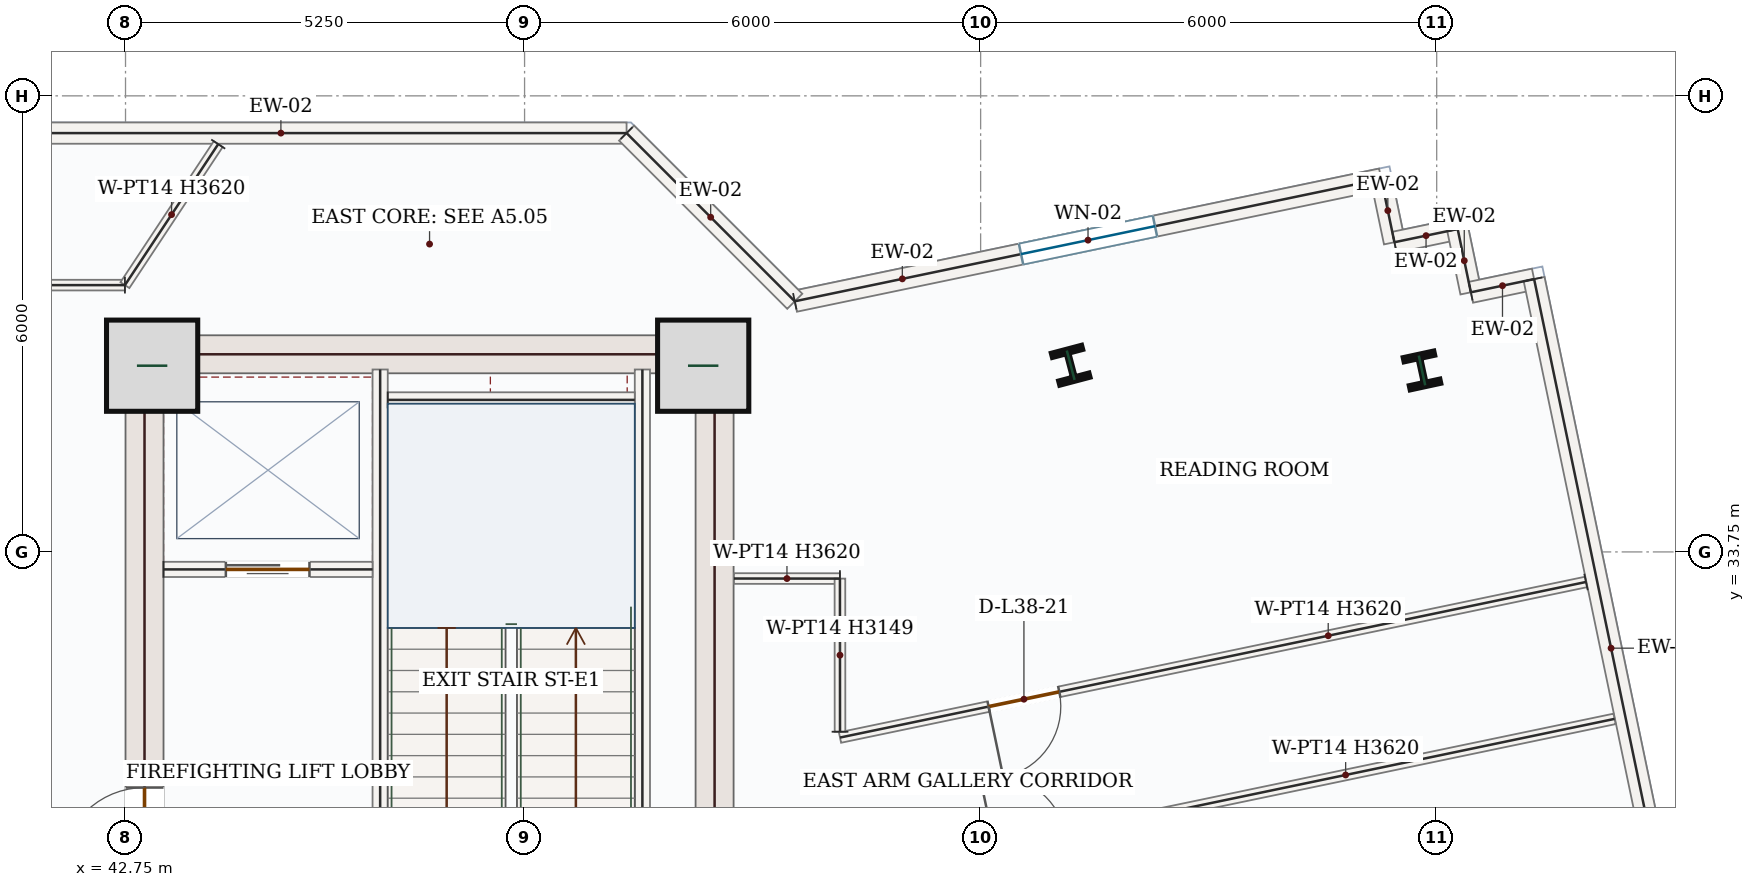
"""IFC4 building model, lengths in metres.
Left out: names, types, materials, properties, quantities, classifications, styles, units other than length and angle.
Written with IfcOpenShell. Run it as: python <this file> out.ifc"""

import sys

from ifc_helpers import new_model, si_unit, direction, frame, frame_2d, origin, origin_2d, place, context, subcontext, project, spatial, rectangle, i_section, extrude, source, transform, mapped, element, fill, save


model = new_model("IFC4")
c1 = context("Model", 3, precision=1e-05, world=origin(), true_north=direction((0.0, 1.0)))
c2 = subcontext(c1, "Body", "Model", "MODEL_VIEW")
j1 = project(units=[si_unit("LENGTHUNIT", "METRE"), si_unit("PLANEANGLEUNIT", "RADIAN")], contexts=[c1])
p1 = place(None, origin())
s1 = spatial("IfcSite", under=j1, at=p1, CompositionType="ELEMENT")
p2 = place(p1, origin())
s2 = spatial("IfcBuilding", under=s1, at=p2, CompositionType="ELEMENT")
p3 = place(p2, frame((0.0, 0.0, 166.8)))
s3 = spatial("IfcBuildingStorey", under=s2, at=p3, CompositionType="ELEMENT", Elevation=166.8)
p4 = place(p3, frame((43.0, 28.05, 0.0), z_axis=(0.0, 0.0, 1.0), x_axis=(0.0, 1.0, 0.0)))
e1 = element("IfcWall", 1, at=p4, inside=s3, PredefinedType="SHEAR", context=c2, shape_type="SweptSolid", body=[
    extrude(rectangle(XDim=8.55, YDim=0.5, at=frame_2d((4.275, 0.0))), origin(), (0.0, 0.0, 1.0), 3.62),
])
p5 = place(p4, frame((1.5, 0.0, 0.0)))
e2 = element("IfcOpeningElement", 2, at=p5, cuts=e1, PredefinedType="OPENING", context=c2, shape_type="SweptSolid", body=[
    extrude(rectangle(XDim=1.1, YDim=2.2, at=frame_2d((0.55, 1.1))), frame((0.0, 0.26, 0.0), z_axis=(0.0, -1.0, 0.0), x_axis=(1.0, 0.0, 0.0)), (0.0, 0.0, 1.0), 0.52),
])
m1 = source(origin(), c2, "Body", "SweptSolid", [
    extrude(rectangle(XDim=8.55, YDim=0.5, at=frame_2d((4.275, 0.0))), origin(), (0.0, 0.0, 1.0), 3.62),
])
p6 = place(p3, frame((50.5, 28.05, 0.0), z_axis=(0.0, 0.0, 1.0), x_axis=(0.0, 1.0, 0.0)))
e3 = element("IfcWall", 3, at=p6, inside=s3, PredefinedType="SHEAR", context=c2, shape_type="MappedRepresentation", body=[
    mapped(m1, transform((0.0, 0.0, 0.0), x_axis=(1.0, 0.0, 0.0), y_axis=(0.0, 1.0, 0.0), z_axis=(0.0, 0.0, 1.0), scale=1.0)),
])
m2 = source(origin(), c2, "Body", "SweptSolid", [
    extrude(rectangle(XDim=7.0, YDim=0.5, at=frame_2d((3.5, 0.0))), origin(), (0.0, 0.0, 1.0), 3.62),
])
p7 = place(p3, frame((43.25, 36.35, 0.0), z_axis=(0.0, 0.0, 1.0), x_axis=(1.0, 0.0, 0.0)))
e4 = element("IfcWall", 4, at=p7, inside=s3, PredefinedType="SHEAR", context=c2, shape_type="MappedRepresentation", body=[
    mapped(m2, transform((0.0, 0.0, 0.0), x_axis=(1.0, 0.0, 0.0), y_axis=(0.0, 1.0, 0.0), z_axis=(0.0, 0.0, 1.0), scale=1.0)),
])
m3 = source(origin(), c2, "Body", "SweptSolid", [
    extrude(rectangle(XDim=1.2, YDim=1.2, at=origin_2d()), origin(), (0.0, 0.0, 1.0), 3.9),
])
for number, where, z_axis, x_axis in (
    (5, (43.1, 36.2, 0.0), (0.0, 0.0, 1.0), (1.0, 0.0, 0.0)),
    (6, (50.35, 36.2, 0.0), (0.0, 0.0, 1.0), (1.0, 0.0, 0.0)),
):
    element("IfcColumn", number, at=place(p3, frame(where, z_axis=z_axis, x_axis=x_axis)), inside=s3, PredefinedType="COLUMN", context=c2, shape_type="MappedRepresentation", body=[
        mapped(m3, transform((0.0, 0.0, 0.0), x_axis=(1.0, 0.0, 0.0), y_axis=(0.0, 1.0, 0.0), z_axis=(0.0, 0.0, 1.0), scale=1.0)),
    ])
m4 = source(origin(), c2, "Body", "SweptSolid", [
    extrude(i_section(OverallWidth=0.412, OverallDepth=0.435, WebThickness=0.036, FlangeThickness=0.057, FilletRadius=0.018, at=origin_2d()), origin(), (0.0, 0.0, 1.0), 3.9),
])
for number, where, z_axis, x_axis in (
    (7, (55.185, 36.206, 0.0), (0.0, 0.0, 1.0), (0.967, 0.255, 0.0)),
    (8, (59.807, 36.137, 0.0), (0.0, 0.0, 1.0), (0.977, 0.211, 0.0)),
):
    element("IfcColumn", number, at=place(p3, frame(where, z_axis=z_axis, x_axis=x_axis)), inside=s3, PredefinedType="COLUMN", context=c2, shape_type="MappedRepresentation", body=[
        mapped(m4, transform((0.0, 0.0, 0.0), x_axis=(1.0, 0.0, 0.0), y_axis=(0.0, 1.0, 0.0), z_axis=(0.0, 0.0, 1.0), scale=1.0)),
    ])
p8 = place(p3, frame((51.555, 37.047, 0.0), z_axis=(0.0, 0.0, 1.0), x_axis=(0.978938136474, 0.204157108515, 0.0)))
e9 = element("IfcWall", 9, at=p8, inside=s3, PredefinedType="SOLIDWALL", context=c2, shape_type="SweptSolid", body=[
    extrude(rectangle(XDim=7.882, YDim=0.28, at=frame_2d((3.941, 0.0))), origin(), (0.0, 0.0, 1.0), 3.62),
])
p9 = place(p8, frame((3.041, 0.0, 0.85)))
e10 = element("IfcOpeningElement", 10, at=p9, cuts=e9, PredefinedType="OPENING", context=c2, shape_type="SweptSolid", body=[
    extrude(rectangle(XDim=1.8, YDim=1.75, at=frame_2d((0.9, 0.875))), frame((0.0, 0.15, 0.0), z_axis=(0.0, -1.0, 0.0), x_axis=(1.0, 0.0, 0.0)), (0.0, 0.0, 1.0), 0.3),
])
m5 = source(origin(), c2, "Body", "SweptSolid", [
    extrude(rectangle(XDim=0.85, YDim=0.28, at=frame_2d((0.425, 0.0))), origin(), (0.0, 0.0, 1.0), 3.62),
])
for number, where, z_axis, x_axis in (
    (11, (59.271, 38.656, 0.0), (0.0, 0.0, 1.0), (0.204, -0.979, 0.0)),
    (12, (59.444, 37.824, 0.0), (0.0, 0.0, 1.0), (0.979, 0.204, 0.0)),
):
    element("IfcWall", number, at=place(p3, frame(where, z_axis=z_axis, x_axis=x_axis)), inside=s3, PredefinedType="SOLIDWALL", context=c2, shape_type="MappedRepresentation", body=[
        mapped(m5, transform((0.0, 0.0, 0.0), x_axis=(1.0, 0.0, 0.0), y_axis=(0.0, 1.0, 0.0), z_axis=(0.0, 0.0, 1.0), scale=1.0)),
    ])
m6 = source(origin(), c2, "Body", "SweptSolid", [
    extrude(rectangle(XDim=0.85, YDim=0.28, at=frame_2d((0.425, 0.0))), origin(), (0.0, 0.0, 1.0), 3.62),
])
p10 = place(p3, frame((60.276, 37.998, 0.0), z_axis=(0.0, 0.0, 1.0), x_axis=(0.204447295999, -0.978877573121, 0.0)))
e13 = element("IfcWall", 13, at=p10, inside=s3, PredefinedType="SOLIDWALL", context=c2, shape_type="MappedRepresentation", body=[
    mapped(m6, transform((0.0, 0.0, 0.0), x_axis=(1.0, 0.0, 0.0), y_axis=(0.0, 1.0, 0.0), z_axis=(0.0, 0.0, 1.0), scale=1.0)),
])
p11 = place(p3, frame((60.45, 37.166, 0.0), z_axis=(0.0, 0.0, 1.0), x_axis=(0.978923028084, 0.20422954019, 0.0)))
e14 = element("IfcWall", 14, at=p11, inside=s3, PredefinedType="SOLIDWALL", context=c2, shape_type="MappedRepresentation", body=[
    mapped(m5, transform((0.0, 0.0, 0.0), x_axis=(1.0, 0.0, 0.0), y_axis=(0.0, 1.0, 0.0), z_axis=(0.0, 0.0, 1.0), scale=1.0)),
])
m7 = source(origin(), c2, "Body", "SweptSolid", [
    extrude(rectangle(XDim=9.92, YDim=0.28, at=frame_2d((4.96, 0.0))), origin(), (0.0, 0.0, 1.0), 3.62),
])
p12 = place(p3, frame((61.282, 37.339, 0.0), z_axis=(0.0, 0.0, 1.0), x_axis=(0.204150812873, -0.978939449406, 0.0)))
e15 = element("IfcWall", 15, at=p12, inside=s3, PredefinedType="SOLIDWALL", context=c2, shape_type="MappedRepresentation", body=[
    mapped(m7, transform((0.0, 0.0, 0.0), x_axis=(1.0, 0.0, 0.0), y_axis=(0.0, 1.0, 0.0), z_axis=(0.0, 0.0, 1.0), scale=1.0)),
])
m8 = source(origin(), c2, "Body", "SweptSolid", [
    extrude(rectangle(XDim=9.095, YDim=0.28, at=frame_2d((4.548, 0.0))), origin(), (0.0, 0.0, 1.0), 3.62),
])
p13 = place(p3, frame((40.247, 39.26, 0.0), z_axis=(0.0, 0.0, 1.0), x_axis=(1.0, 0.0, 0.0)))
e16 = element("IfcWall", 16, at=p13, inside=s3, PredefinedType="SOLIDWALL", context=c2, shape_type="MappedRepresentation", body=[
    mapped(m8, transform((0.0, 0.0, 0.0), x_axis=(1.0, 0.0, 0.0), y_axis=(0.0, 1.0, 0.0), z_axis=(0.0, 0.0, 1.0), scale=1.0)),
])
m9 = source(origin(), c2, "Body", "SweptSolid", [
    extrude(rectangle(XDim=3.129, YDim=0.28, at=frame_2d((1.565, 0.0))), origin(), (0.0, 0.0, 1.0), 3.62),
])
p14 = place(p3, frame((49.342, 39.26, 0.0), z_axis=(0.0, 0.0, 1.0), x_axis=(0.707067771627, -0.707145788594, 0.0)))
e17 = element("IfcWall", 17, at=p14, inside=s3, PredefinedType="SOLIDWALL", context=c2, shape_type="MappedRepresentation", body=[
    mapped(m9, transform((0.0, 0.0, 0.0), x_axis=(1.0, 0.0, 0.0), y_axis=(0.0, 1.0, 0.0), z_axis=(0.0, 0.0, 1.0), scale=1.0)),
])
m10 = source(origin(), c2, "Body", "SweptSolid", [
    extrude(rectangle(XDim=7.87, YDim=0.2, at=frame_2d((3.935, 0.0))), origin(), (0.0, 0.0, 1.0), 3.62),
])
p15 = place(p3, frame((49.55, 28.28, 0.0), z_axis=(0.0, 0.0, 1.0), x_axis=(0.0, 1.0, 0.0)))
e18 = element("IfcWall", 18, at=p15, inside=s3, PredefinedType="SOLIDWALL", context=c2, shape_type="MappedRepresentation", body=[
    mapped(m10, transform((0.0, 0.0, 0.0), x_axis=(1.0, 0.0, 0.0), y_axis=(0.0, 1.0, 0.0), z_axis=(0.0, 0.0, 1.0), scale=1.0)),
])
p16 = place(p3, frame((46.1, 28.15, 0.0), z_axis=(0.0, 0.0, 1.0), x_axis=(0.0, 1.0, 0.0)))
e19 = element("IfcWall", 19, at=p16, inside=s3, PredefinedType="SOLIDWALL", context=c2, shape_type="SweptSolid", body=[
    extrude(rectangle(XDim=8.0, YDim=0.2, at=frame_2d((4.0, 0.0))), origin(), (0.0, 0.0, 1.0), 3.62),
])
p17 = place(p16, frame((0.4, 0.0, 0.0)))
e20 = element("IfcOpeningElement", 20, at=p17, cuts=e19, PredefinedType="OPENING", context=c2, shape_type="SweptSolid", body=[
    extrude(rectangle(XDim=1.05, YDim=2.15, at=frame_2d((0.525, 1.075))), frame((0.0, 0.11, 0.0), z_axis=(0.0, -1.0, 0.0), x_axis=(1.0, 0.0, 0.0)), (0.0, 0.0, 1.0), 0.22),
])
m11 = source(origin(), c2, "Body", "SweptSolid", [
    extrude(rectangle(XDim=3.25, YDim=0.2, at=frame_2d((1.625, 0.0))), origin(), (0.0, 0.0, 1.0), 3.62),
])
p18 = place(p3, frame((46.2, 35.75, 0.0), z_axis=(0.0, 0.0, 1.0), x_axis=(1.0, 0.0, 0.0)))
e21 = element("IfcWall", 21, at=p18, inside=s3, PredefinedType="SOLIDWALL", context=c2, shape_type="MappedRepresentation", body=[
    mapped(m11, transform((0.0, 0.0, 0.0), x_axis=(1.0, 0.0, 0.0), y_axis=(0.0, 1.0, 0.0), z_axis=(0.0, 0.0, 1.0), scale=1.0)),
])
p19 = place(p3, frame((43.25, 33.52, 0.0), z_axis=(0.0, 0.0, 1.0), x_axis=(1.0, 0.0, 0.0)))
e22 = element("IfcWall", 22, at=p19, inside=s3, PredefinedType="SOLIDWALL", context=c2, shape_type="SweptSolid", body=[
    extrude(rectangle(XDim=2.75, YDim=0.2, at=frame_2d((1.375, 0.0))), origin(), (0.0, 0.0, 1.0), 3.62),
])
p20 = place(p19, frame((0.82, 0.0, 0.0)))
e23 = element("IfcOpeningElement", 23, at=p20, cuts=e22, PredefinedType="OPENING", context=c2, shape_type="SweptSolid", body=[
    extrude(rectangle(XDim=1.1, YDim=2.15, at=frame_2d((0.55, 1.075))), frame((0.0, 0.11, 0.0), z_axis=(0.0, -1.0, 0.0), x_axis=(1.0, 0.0, 0.0)), (0.0, 0.0, 1.0), 0.22),
])
p21 = place(p3, frame((42.742, 37.26, 0.0), z_axis=(0.0, 0.0, 1.0), x_axis=(-1.0, 0.0, 0.0)))
e24 = element("IfcWall", 24, at=p21, inside=s3, PredefinedType="PARTITIONING", context=c2, shape_type="SweptSolid", body=[
    extrude(rectangle(XDim=7.942, YDim=0.14, at=frame_2d((3.971, 0.0))), origin(), (0.0, 0.0, 1.0), 3.62),
])
p22 = place(p21, frame((5.454, 0.0, 0.0)))
e25 = element("IfcOpeningElement", 25, at=p22, cuts=e24, PredefinedType="OPENING", context=c2, shape_type="SweptSolid", body=[
    extrude(rectangle(XDim=0.95, YDim=2.15, at=frame_2d((0.475, 1.075))), frame((0.0, 0.08, 0.0), z_axis=(0.0, -1.0, 0.0), x_axis=(1.0, 0.0, 0.0)), (0.0, 0.0, 1.0), 0.16),
])
m12 = source(origin(), c2, "Body", "SweptSolid", [
    extrude(rectangle(XDim=2.224, YDim=0.14, at=frame_2d((1.112, 0.0))), origin(), (0.0, 0.0, 1.0), 3.62),
])
p23 = place(p3, frame((43.969, 39.115, 0.0), z_axis=(0.0, 0.0, 1.0), x_axis=(-0.551783828078, -0.833987174405, 0.0)))
e26 = element("IfcWall", 26, at=p23, inside=s3, PredefinedType="PARTITIONING", context=c2, shape_type="MappedRepresentation", body=[
    mapped(m12, transform((0.0, 0.0, 0.0), x_axis=(1.0, 0.0, 0.0), y_axis=(0.0, 1.0, 0.0), z_axis=(0.0, 0.0, 1.0), scale=1.0)),
])
p24 = place(p3, frame((52.15, 29.428, 0.0), z_axis=(0.0, 0.0, 1.0), x_axis=(0.978935516763, 0.204169669688, 0.0)))
e27 = element("IfcWall", 27, at=p24, inside=s3, PredefinedType="PARTITIONING", context=c2, shape_type="SweptSolid", body=[
    extrude(rectangle(XDim=10.409, YDim=0.14, at=frame_2d((5.205, 0.0))), origin(), (0.0, 0.0, 1.0), 3.62),
])
p25 = place(p24, frame((2.081, 0.0, 0.0)))
e28 = element("IfcOpeningElement", 28, at=p25, cuts=e27, PredefinedType="OPENING", context=c2, shape_type="SweptSolid", body=[
    extrude(rectangle(XDim=0.95, YDim=2.15, at=frame_2d((0.475, 1.075))), frame((0.0, 0.08, 0.0), z_axis=(0.0, -1.0, 0.0), x_axis=(1.0, 0.0, 0.0)), (0.0, 0.0, 1.0), 0.16),
])
m13 = source(origin(), c2, "Body", "SweptSolid", [
    extrude(rectangle(XDim=1.394, YDim=0.14, at=frame_2d((0.697, 0.0))), origin(), (0.0, 0.0, 1.0), 3.62),
])
p26 = place(p3, frame((52.149, 33.399, 0.0), z_axis=(0.0, 0.0, 1.0), x_axis=(-0.999999754632, 0.000700525222, 0.0)))
e29 = element("IfcWall", 29, at=p26, inside=s3, PredefinedType="PARTITIONING", context=c2, shape_type="MappedRepresentation", body=[
    mapped(m13, transform((0.0, 0.0, 0.0), x_axis=(1.0, 0.0, 0.0), y_axis=(0.0, 1.0, 0.0), z_axis=(0.0, 0.0, 1.0), scale=1.0)),
])
p27 = place(p3, frame((61.965, 33.354, 0.0), z_axis=(0.0, 0.0, 1.0), x_axis=(-0.978942518705, -0.204136094483, 0.0)))
e30 = element("IfcWall", 30, at=p27, inside=s3, PredefinedType="PARTITIONING", context=c2, shape_type="SweptSolid", body=[
    extrude(rectangle(XDim=10.026, YDim=0.14, at=frame_2d((5.013, 0.0))), origin(), (0.0, 0.0, 1.0), 3.62),
])
p28 = place(p27, frame((7.079, 0.0, 0.0)))
e31 = element("IfcOpeningElement", 31, at=p28, cuts=e30, PredefinedType="OPENING", context=c2, shape_type="SweptSolid", body=[
    extrude(rectangle(XDim=0.95, YDim=2.15, at=frame_2d((0.475, 1.075))), frame((0.0, 0.08, 0.0), z_axis=(0.0, -1.0, 0.0), x_axis=(1.0, 0.0, 0.0)), (0.0, 0.0, 1.0), 0.16),
])
m14 = source(origin(), c2, "Body", "SweptSolid", [
    extrude(rectangle(XDim=2.014, YDim=0.14, at=frame_2d((1.007, 0.0))), origin(), (0.0, 0.0, 1.0), 3.149),
])
p29 = place(p3, frame((52.15, 31.385, 0.0), z_axis=(0.0, 0.0, 1.0), x_axis=(-0.000484789665, 0.999999882489, 0.0)))
e32 = element("IfcWall", 32, at=p29, inside=s3, PredefinedType="PARTITIONING", context=c2, shape_type="MappedRepresentation", body=[
    mapped(m14, transform((0.0, 0.0, 0.0), x_axis=(1.0, 0.0, 0.0), y_axis=(0.0, 1.0, 0.0), z_axis=(0.0, 0.0, 1.0), scale=1.0)),
])
m15 = source(origin(), c2, "Body", "SweptSolid", [
    extrude(rectangle(XDim=1.8, YDim=1.75, at=frame_2d((0.9, 0.875))), frame((0.0, 0.03, 0.0), z_axis=(0.0, -1.0, 0.0), x_axis=(1.0, 0.0, 0.0)), (0.0, 0.0, 1.0), 0.06),
])
p30 = place(p9, origin())
e33 = element("IfcWindow", 33, at=p30, inside=s3, PartitioningType="DOUBLE_PANEL_VERTICAL", PredefinedType="WINDOW", context=c2, shape_type="MappedRepresentation", body=[
    mapped(m15, transform((0.0, 0.0, 0.0), x_axis=(1.0, 0.0, 0.0), y_axis=(0.0, 1.0, 0.0), z_axis=(0.0, 0.0, 1.0), scale=1.0)),
])
fill(e10, e33)
m16 = source(origin(), c2, "Body", "SweptSolid", [
    extrude(rectangle(XDim=1.1, YDim=2.15, at=frame_2d((0.55, 1.075))), frame((0.0, 0.025, 0.0), z_axis=(0.0, -1.0, 0.0), x_axis=(1.0, 0.0, 0.0)), (0.0, 0.0, 1.0), 0.05),
])
p31 = place(p20, origin())
e34 = element("IfcDoor", 34, at=p31, inside=s3, OperationType="DOUBLE_DOOR_SLIDING", PredefinedType="DOOR", context=c2, shape_type="MappedRepresentation", body=[
    mapped(m16, transform((0.0, 0.0, 0.0), x_axis=(1.0, 0.0, 0.0), y_axis=(0.0, 1.0, 0.0), z_axis=(0.0, 0.0, 1.0), scale=1.0)),
])
fill(e23, e34)
m17 = source(origin(), c2, "Body", "SweptSolid", [
    extrude(rectangle(XDim=1.1, YDim=2.2, at=frame_2d((0.55, 1.1))), frame((0.0, 0.025, 0.0), z_axis=(0.0, -1.0, 0.0), x_axis=(1.0, 0.0, 0.0)), (0.0, 0.0, 1.0), 0.05),
])
p32 = place(p5, origin())
e35 = element("IfcDoor", 35, at=p32, inside=s3, OperationType="SINGLE_SWING_LEFT", PredefinedType="DOOR", context=c2, shape_type="MappedRepresentation", body=[
    mapped(m17, transform((0.0, 0.0, 0.0), x_axis=(1.0, 0.0, 0.0), y_axis=(0.0, 1.0, 0.0), z_axis=(0.0, 0.0, 1.0), scale=1.0)),
])
fill(e2, e35)
m18 = source(origin(), c2, "Body", "SweptSolid", [
    extrude(rectangle(XDim=0.95, YDim=2.15, at=frame_2d((0.475, 1.075))), frame((0.0, 0.025, 0.0), z_axis=(0.0, -1.0, 0.0), x_axis=(1.0, 0.0, 0.0)), (0.0, 0.0, 1.0), 0.05),
])
p33 = place(p28, origin())
e36 = element("IfcDoor", 36, at=p33, inside=s3, OperationType="SINGLE_SWING_RIGHT", PredefinedType="DOOR", context=c2, shape_type="MappedRepresentation", body=[
    mapped(m18, transform((0.0, 0.0, 0.0), x_axis=(1.0, 0.0, 0.0), y_axis=(0.0, 1.0, 0.0), z_axis=(0.0, 0.0, 1.0), scale=1.0)),
])
fill(e31, e36)
save(model, sys.argv[1])
